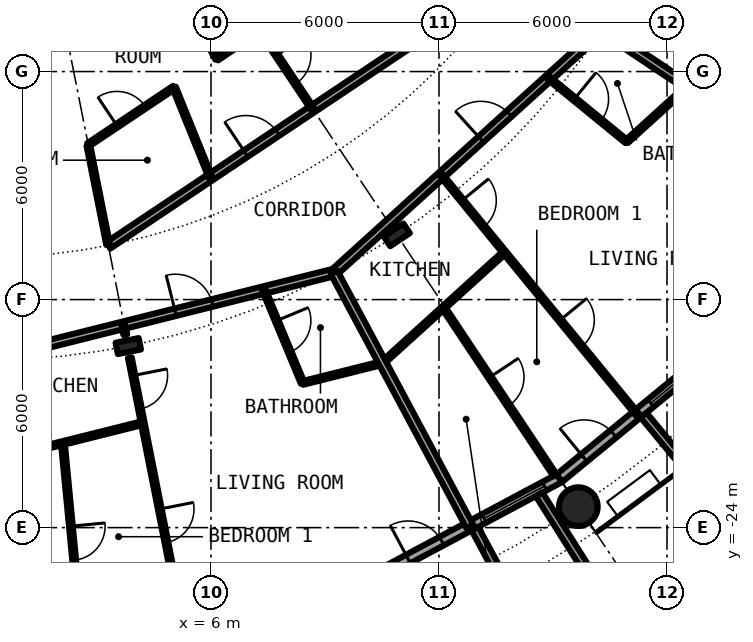
"""IFC4 building model, lengths in metres.
Left out: names, types, materials, properties, quantities, classifications, styles, units other than length and angle.
Written with IfcOpenShell. Run it as: python <this file> out.ifc"""

import sys

from ifc_helpers import new_model, si_unit, direction, frame, frame_2d, origin, origin_2d, place, context, subcontext, project, spatial, rectangle, hollow_circle, i_section, extrude, element, fill, save


model = new_model("IFC4")
c1 = context("Model", 3, precision=1e-05, world=origin(), true_north=direction((0.0, 1.0)))
c2 = subcontext(c1, "Body", "Model", "MODEL_VIEW")
j1 = project(units=[si_unit("LENGTHUNIT", "METRE"), si_unit("PLANEANGLEUNIT", "RADIAN")], contexts=[c1])
p1 = place(None, origin())
s1 = spatial("IfcSite", under=j1, at=p1, CompositionType="ELEMENT")
p2 = place(p1, origin())
s2 = spatial("IfcBuilding", under=s1, at=p2, CompositionType="ELEMENT")
p3 = place(p2, frame((0.0, 0.0, 31.95)))
s3 = spatial("IfcBuildingStorey", under=s2, at=p3, CompositionType="ELEMENT", Elevation=31.95)
p4 = place(p3, frame((15.667, -23.448, 0.0), z_axis=(0.0, 0.0, 1.0), x_axis=(1.0, 0.0, 0.0)))
e1 = element("IfcColumn", 1, at=p4, inside=s3, PredefinedType="COLUMN", context=c2, shape_type="SweptSolid", body=[
    extrude(hollow_circle(Radius=0.508, WallThickness=0.05, at=origin_2d()), origin(), (0.0, 0.0, 1.0), 3.05),
])
for number, where, z_axis, x_axis in (
    (2, (3.824, -19.223, 0.0), (0.0, 0.0, 1.0), (0.195, -0.981, 0.0)),
    (3, (10.889, -16.297, 0.0), (0.0, 0.0, 1.0), (0.556, -0.831, 0.0)),
):
    element("IfcColumn", number, at=place(p3, frame(where, z_axis=z_axis, x_axis=x_axis)), inside=s3, PredefinedType="COLUMN", context=c2, shape_type="SweptSolid", body=[
        extrude(i_section(OverallWidth=0.305, OverallDepth=0.62, WebThickness=0.021, FlangeThickness=0.04, FilletRadius=0.027, at=origin_2d()), origin(), (0.0, 0.0, 1.0), 3.05),
    ])
p5 = place(p3, frame((10.447, -25.222, 0.0), z_axis=(0.0, 0.0, 1.0), x_axis=(0.881915646801, 0.471407246368, 0.0)))
e4 = element("IfcWall", 4, at=p5, inside=s3, PredefinedType="SOLIDWALL", context=c2, shape_type="SweptSolid", body=[
    extrude(rectangle(XDim=5.352, YDim=0.25, at=frame_2d((2.676, 0.0))), origin(), (0.0, 0.0, 1.0), 2.7),
])
p6 = place(p5, frame((0.841, 0.0, 0.0)))
e5 = element("IfcOpeningElement", 5, at=p6, cuts=e4, PredefinedType="OPENING", context=c2, shape_type="SweptSolid", body=[
    extrude(rectangle(XDim=1.0, YDim=2.2, at=frame_2d((0.5, 1.1))), frame((0.0, 0.135, 0.0), z_axis=(0.0, -1.0, 0.0), x_axis=(1.0, 0.0, 0.0)), (0.0, 0.0, 1.0), 0.27),
])
p7 = place(p5, frame((3.111, 0.0, 0.3)))
e6 = element("IfcOpeningElement", 6, at=p7, cuts=e4, PredefinedType="OPENING", context=c2, shape_type="SweptSolid", body=[
    extrude(rectangle(XDim=1.8, YDim=2.1, at=frame_2d((0.9, 1.05))), frame((0.0, 0.135, 0.0), z_axis=(0.0, -1.0, 0.0), x_axis=(1.0, 0.0, 0.0)), (0.0, 0.0, 1.0), 0.27),
])
p8 = place(p3, frame((12.945, -24.029, -0.03), z_axis=(0.0, 0.0, 1.0), x_axis=(0.474424310775, -0.88029629861, 0.0)))
e7 = element("IfcWall", 7, at=p8, inside=s3, PredefinedType="SOLIDWALL", context=c2, shape_type="SweptSolid", body=[
    extrude(rectangle(XDim=3.006, YDim=0.2, at=frame_2d((1.503, 0.0))), origin(), (0.0, 0.0, 1.0), 2.73),
])
p9 = place(p3, frame((14.635, -23.126, -0.03), z_axis=(0.0, 0.0, 1.0), x_axis=(0.534437802731, -0.845207805816, 0.0)))
e8 = element("IfcWall", 8, at=p9, inside=s3, PredefinedType="SOLIDWALL", context=c2, shape_type="SweptSolid", body=[
    extrude(rectangle(XDim=2.932, YDim=0.2, at=frame_2d((1.466, 0.0))), origin(), (0.0, 0.0, 1.0), 2.73),
])
p10 = place(p3, frame((15.167, -22.699, 0.0), z_axis=(0.0, 0.0, 1.0), x_axis=(0.773019449054, 0.634382322723, 0.0)))
e9 = element("IfcWall", 9, at=p10, inside=s3, PredefinedType="SOLIDWALL", context=c2, shape_type="SweptSolid", body=[
    extrude(rectangle(XDim=5.352, YDim=0.25, at=frame_2d((2.676, 0.0))), origin(), (0.0, 0.0, 1.0), 2.7),
])
p11 = place(p10, frame((0.841, 0.0, 0.0)))
e10 = element("IfcOpeningElement", 10, at=p11, cuts=e9, PredefinedType="OPENING", context=c2, shape_type="SweptSolid", body=[
    extrude(rectangle(XDim=1.0, YDim=2.2, at=frame_2d((0.5, 1.1))), frame((0.0, 0.135, 0.0), z_axis=(0.0, -1.0, 0.0), x_axis=(1.0, 0.0, 0.0)), (0.0, 0.0, 1.0), 0.27),
])
p12 = place(p10, frame((3.111, 0.0, 0.3)))
e11 = element("IfcOpeningElement", 11, at=p12, cuts=e9, PredefinedType="OPENING", context=c2, shape_type="SweptSolid", body=[
    extrude(rectangle(XDim=1.8, YDim=2.1, at=frame_2d((0.9, 1.05))), frame((0.0, 0.135, 0.0), z_axis=(0.0, -1.0, 0.0), x_axis=(1.0, 0.0, 0.0)), (0.0, 0.0, 1.0), 0.27),
])
p13 = place(p3, frame((17.384, -21.041, -0.03), z_axis=(0.0, 0.0, 1.0), x_axis=(0.63709551667, -0.770784861449, 0.0)))
e12 = element("IfcWall", 12, at=p13, inside=s3, PredefinedType="SOLIDWALL", context=c2, shape_type="SweptSolid", body=[
    extrude(rectangle(XDim=3.006, YDim=0.2, at=frame_2d((1.503, 0.0))), origin(), (0.0, 0.0, 1.0), 2.73),
])
p14 = place(p3, frame((-0.006, -22.301, 0.0), z_axis=(0.0, 0.0, 1.0), x_axis=(0.970106148391, 0.24268098577, 0.0)))
e13 = element("IfcWall", 13, at=p14, inside=s3, PredefinedType="PARTITIONING", context=c2, shape_type="SweptSolid", body=[
    extrude(rectangle(XDim=4.347, YDim=0.1, at=frame_2d((2.173, 0.0))), origin(), (0.0, 0.0, 1.0), 2.7),
])
p15 = place(p3, frame((8.414, -20.193, 0.0), z_axis=(0.0, 0.0, 1.0), x_axis=(0.970076188308, 0.242800718444, 0.0)))
e14 = element("IfcWall", 14, at=p15, inside=s3, PredefinedType="PARTITIONING", context=c2, shape_type="SweptSolid", body=[
    extrude(rectangle(XDim=2.167, YDim=0.1, at=frame_2d((1.083, 0.0))), origin(), (0.0, 0.0, 1.0), 2.7),
])
p16 = place(p3, frame((10.513, -19.668, 0.0), z_axis=(0.0, 0.0, 1.0), x_axis=(0.74092137325, 0.671591779775, 0.0)))
e15 = element("IfcWall", 15, at=p16, inside=s3, PredefinedType="PARTITIONING", context=c2, shape_type="SweptSolid", body=[
    extrude(rectangle(XDim=4.342, YDim=0.1, at=frame_2d((2.171, 0.0))), origin(), (0.0, 0.0, 1.0), 2.7),
])
p17 = place(p3, frame((16.936, -13.845, 0.0), z_axis=(0.0, 0.0, 1.0), x_axis=(0.740836325503, 0.671685595212, 0.0)))
e16 = element("IfcWall", 16, at=p17, inside=s3, PredefinedType="PARTITIONING", context=c2, shape_type="SweptSolid", body=[
    extrude(rectangle(XDim=2.168, YDim=0.1, at=frame_2d((1.084, 0.0))), origin(), (0.0, 0.0, 1.0), 2.7),
])
p18 = place(p3, frame((-0.001, -19.601, 0.0), z_axis=(0.0, 0.0, 1.0), x_axis=(0.970014215304, 0.243048188859, 0.0)))
e17 = element("IfcWall", 17, at=p18, inside=s3, PredefinedType="PARTITIONING", context=c2, shape_type="SweptSolid", body=[
    extrude(rectangle(XDim=9.526, YDim=0.2, at=frame_2d((4.763, 0.0))), origin(), (0.0, 0.0, 1.0), 2.38),
])
p19 = place(p18, frame((5.221, 0.0, 0.0)))
e18 = element("IfcOpeningElement", 18, at=p19, cuts=e17, PredefinedType="OPENING", context=c2, shape_type="SweptSolid", body=[
    extrude(rectangle(XDim=1.0, YDim=2.3, at=frame_2d((0.5, 1.15))), frame((0.0, 0.11, 0.0), z_axis=(0.0, -1.0, 0.0), x_axis=(1.0, 0.0, 0.0)), (0.0, 0.0, 1.0), 0.22),
])
p20 = place(p3, frame((9.239, -17.286, 0.0), z_axis=(0.0, 0.0, 1.0), x_axis=(0.74089212117, 0.671624050186, 0.0)))
e19 = element("IfcWall", 19, at=p20, inside=s3, PredefinedType="PARTITIONING", context=c2, shape_type="SweptSolid", body=[
    extrude(rectangle(XDim=9.368, YDim=0.2, at=frame_2d((4.684, 0.0))), origin(), (0.0, 0.0, 1.0), 2.38),
])
p21 = place(p20, frame((5.215, 0.0, 0.0)))
e20 = element("IfcOpeningElement", 20, at=p21, cuts=e19, PredefinedType="OPENING", context=c2, shape_type="SweptSolid", body=[
    extrude(rectangle(XDim=1.0, YDim=2.3, at=frame_2d((0.5, 1.15))), frame((0.0, 0.11, 0.0), z_axis=(0.0, -1.0, 0.0), x_axis=(1.0, 0.0, 0.0)), (0.0, 0.0, 1.0), 0.22),
])
p22 = place(p3, frame((3.297, -16.575, 0.0), z_axis=(0.0, 0.0, 1.0), x_axis=(0.831561346449, 0.555432918625, 0.0)))
e21 = element("IfcWall", 21, at=p22, inside=s3, PredefinedType="PARTITIONING", context=c2, shape_type="SweptSolid", body=[
    extrude(rectangle(XDim=12.914, YDim=0.2, at=frame_2d((6.457, 0.0))), origin(), (0.0, 0.0, 1.0), 2.7),
])
p23 = place(p22, frame((4.352, 0.0, 0.0)))
e22 = element("IfcOpeningElement", 22, at=p23, cuts=e21, PredefinedType="OPENING", context=c2, shape_type="SweptSolid", body=[
    extrude(rectangle(XDim=1.0, YDim=2.3, at=frame_2d((0.5, 1.15))), frame((0.0, 0.11, 0.0), z_axis=(0.0, -1.0, 0.0), x_axis=(1.0, 0.0, 0.0)), (0.0, 0.0, 1.0), 0.22),
])
p24 = place(p3, frame((2.77, -13.927, 0.0), z_axis=(0.0, 0.0, 1.0), x_axis=(0.831538390496, 0.555467285384, 0.0)))
e23 = element("IfcWall", 23, at=p24, inside=s3, PredefinedType="PARTITIONING", context=c2, shape_type="SweptSolid", body=[
    extrude(rectangle(XDim=2.717, YDim=0.1, at=frame_2d((1.358, 0.0))), origin(), (0.0, 0.0, 1.0), 2.7),
])
p25 = place(p24, frame((0.908, 0.0, 0.0)))
e24 = element("IfcOpeningElement", 24, at=p25, cuts=e23, PredefinedType="OPENING", context=c2, shape_type="SweptSolid", body=[
    extrude(rectangle(XDim=0.9, YDim=2.3, at=frame_2d((0.45, 1.15))), frame((0.0, 0.06, 0.0), z_axis=(0.0, -1.0, 0.0), x_axis=(1.0, 0.0, 0.0)), (0.0, 0.0, 1.0), 0.12),
])
p26 = place(p3, frame((6.158, -11.664, 0.0), z_axis=(0.0, 0.0, 1.0), x_axis=(0.831459707426, 0.555585056429, 0.0)))
e25 = element("IfcWall", 25, at=p26, inside=s3, PredefinedType="PARTITIONING", context=c2, shape_type="SweptSolid", body=[
    extrude(rectangle(XDim=4.073, YDim=0.1, at=frame_2d((2.037, 0.0))), origin(), (0.0, 0.0, 1.0), 2.7),
])
p27 = place(p3, frame((2.102, -21.773, 0.0), z_axis=(0.0, 0.0, 1.0), x_axis=(0.096215269366, -0.995360548716, 0.0)))
e26 = element("IfcWall", 26, at=p27, inside=s3, PredefinedType="PARTITIONING", context=c2, shape_type="SweptSolid", body=[
    extrude(rectangle(XDim=5.301, YDim=0.1, at=frame_2d((2.65, 0.0))), origin(), (0.0, 0.0, 1.0), 2.7),
])
p28 = place(p27, frame((2.2, 0.0, 0.0)))
e27 = element("IfcOpeningElement", 27, at=p28, cuts=e26, PredefinedType="OPENING", context=c2, shape_type="SweptSolid", body=[
    extrude(rectangle(XDim=0.9, YDim=2.3, at=frame_2d((0.45, 1.15))), frame((0.0, 0.06, 0.0), z_axis=(0.0, -1.0, 0.0), x_axis=(1.0, 0.0, 0.0)), (0.0, 0.0, 1.0), 0.12),
])
p29 = place(p3, frame((3.605, -6.827, 0.0), z_axis=(0.0, 0.0, 1.0), x_axis=(0.466976820365, -0.884269556889, 0.0)))
e28 = element("IfcWall", 28, at=p29, inside=s3, PredefinedType="PARTITIONING", context=c2, shape_type="SweptSolid", body=[
    extrude(rectangle(XDim=5.469, YDim=0.1, at=frame_2d((2.735, 0.0))), origin(), (0.0, 0.0, 1.0), 2.7),
])
p30 = place(p29, frame((2.284, 0.0, 0.0)))
e29 = element("IfcOpeningElement", 29, at=p30, cuts=e28, PredefinedType="OPENING", context=c2, shape_type="SweptSolid", body=[
    extrude(rectangle(XDim=0.9, YDim=2.3, at=frame_2d((0.45, 1.15))), frame((0.0, 0.06, 0.0), z_axis=(0.0, -1.0, 0.0), x_axis=(1.0, 0.0, 0.0)), (0.0, 0.0, 1.0), 0.12),
])
p31 = place(p3, frame((3.695, -18.674, 0.0), z_axis=(0.0, 0.0, 1.0), x_axis=(0.197040251839, -0.980395399395, 0.0)))
e30 = element("IfcWall", 30, at=p31, inside=s3, PredefinedType="PARTITIONING", context=c2, shape_type="SweptSolid", body=[
    extrude(rectangle(XDim=0.254, YDim=0.1, at=frame_2d((0.127, 0.0))), origin(), (0.0, 0.0, 1.0), 2.7),
])
p32 = place(p3, frame((3.865, -19.531, 0.0), z_axis=(0.0, 0.0, 1.0), x_axis=(0.194196464481, -0.980962656365, 0.0)))
e31 = element("IfcWall", 31, at=p32, inside=s3, PredefinedType="PARTITIONING", context=c2, shape_type="SweptSolid", body=[
    extrude(rectangle(XDim=7.265, YDim=0.1, at=frame_2d((3.633, 0.0))), origin(), (0.0, 0.0, 1.0), 2.7),
])
p33 = place(p32, frame((0.476, 0.0, 0.0)))
e32 = element("IfcOpeningElement", 32, at=p33, cuts=e31, PredefinedType="OPENING", context=c2, shape_type="SweptSolid", body=[
    extrude(rectangle(XDim=0.9, YDim=2.3, at=frame_2d((0.45, 1.15))), frame((0.0, 0.06, 0.0), z_axis=(0.0, -1.0, 0.0), x_axis=(1.0, 0.0, 0.0)), (0.0, 0.0, 1.0), 0.12),
])
p34 = place(p32, frame((4.058, 0.0, 0.0)))
e33 = element("IfcOpeningElement", 33, at=p34, cuts=e31, PredefinedType="OPENING", context=c2, shape_type="SweptSolid", body=[
    extrude(rectangle(XDim=0.9, YDim=2.3, at=frame_2d((0.45, 1.15))), frame((0.0, 0.06, 0.0), z_axis=(0.0, -1.0, 0.0), x_axis=(1.0, 0.0, 0.0)), (0.0, 0.0, 1.0), 0.12),
])
p35 = place(p3, frame((5.029, -12.418, 0.0), z_axis=(0.0, 0.0, 1.0), x_axis=(0.375649498413, -0.926761811008, 0.0)))
e34 = element("IfcWall", 34, at=p35, inside=s3, PredefinedType="PARTITIONING", context=c2, shape_type="SweptSolid", body=[
    extrude(rectangle(XDim=2.548, YDim=0.1, at=frame_2d((1.274, 0.0))), origin(), (0.0, 0.0, 1.0), 2.7),
])
p36 = place(p3, frame((7.289, -10.908, 0.0), z_axis=(0.0, 0.0, 1.0), x_axis=(0.555355163998, -0.831613276602, 0.0)))
e35 = element("IfcWall", 35, at=p36, inside=s3, PredefinedType="PARTITIONING", context=c2, shape_type="SweptSolid", body=[
    extrude(rectangle(XDim=2.494, YDim=0.1, at=frame_2d((1.247, 0.0))), origin(), (0.0, 0.0, 1.0), 2.7),
])
p37 = place(p36, frame((0.797, 0.0, 0.0)))
e36 = element("IfcOpeningElement", 36, at=p37, cuts=e35, PredefinedType="OPENING", context=c2, shape_type="SweptSolid", body=[
    extrude(rectangle(XDim=0.9, YDim=2.3, at=frame_2d((0.45, 1.15))), frame((0.0, 0.06, 0.0), z_axis=(0.0, -1.0, 0.0), x_axis=(1.0, 0.0, 0.0)), (0.0, 0.0, 1.0), 0.12),
])
p38 = place(p3, frame((7.392, -17.749, 0.0), z_axis=(0.0, 0.0, 1.0), x_axis=(0.384438589316, -0.923150567917, 0.0)))
e37 = element("IfcWall", 37, at=p38, inside=s3, PredefinedType="PARTITIONING", context=c2, shape_type="SweptSolid", body=[
    extrude(rectangle(XDim=2.647, YDim=0.1, at=frame_2d((1.324, 0.0))), origin(), (0.0, 0.0, 1.0), 2.7),
])
p39 = place(p38, frame((0.874, 0.0, 0.0)))
e38 = element("IfcOpeningElement", 38, at=p39, cuts=e37, PredefinedType="OPENING", context=c2, shape_type="SweptSolid", body=[
    extrude(rectangle(XDim=0.9, YDim=2.3, at=frame_2d((0.45, 1.15))), frame((0.0, 0.06, 0.0), z_axis=(0.0, -1.0, 0.0), x_axis=(1.0, 0.0, 0.0)), (0.0, 0.0, 1.0), 0.12),
])
p40 = place(p3, frame((9.239, -17.286, 0.0), z_axis=(0.0, 0.0, 1.0), x_axis=(0.471439510802, -0.881898399848, 0.0)))
e39 = element("IfcWall", 39, at=p40, inside=s3, PredefinedType="PARTITIONING", context=c2, shape_type="SweptSolid", body=[
    extrude(rectangle(XDim=7.575, YDim=0.2, at=frame_2d((3.787, 0.0))), origin(), (0.0, 0.0, 1.0), 2.7),
])
p41 = place(p3, frame((12.062, -14.727, 0.0), z_axis=(0.0, 0.0, 1.0), x_axis=(0.633664062855, -0.773608334654, 0.0)))
e40 = element("IfcWall", 40, at=p41, inside=s3, PredefinedType="PARTITIONING", context=c2, shape_type="SweptSolid", body=[
    extrude(rectangle(XDim=8.138, YDim=0.1, at=frame_2d((4.069, 0.0))), origin(), (0.0, 0.0, 1.0), 2.7),
])
p42 = place(p41, frame((0.861, 0.0, 0.0)))
e41 = element("IfcOpeningElement", 41, at=p42, cuts=e40, PredefinedType="OPENING", context=c2, shape_type="SweptSolid", body=[
    extrude(rectangle(XDim=0.9, YDim=2.3, at=frame_2d((0.45, 1.15))), frame((0.0, 0.06, 0.0), z_axis=(0.0, -1.0, 0.0), x_axis=(1.0, 0.0, 0.0)), (0.0, 0.0, 1.0), 0.12),
])
p43 = place(p41, frame((4.931, 0.0, 0.0)))
e42 = element("IfcOpeningElement", 42, at=p43, cuts=e40, PredefinedType="OPENING", context=c2, shape_type="SweptSolid", body=[
    extrude(rectangle(XDim=0.9, YDim=2.3, at=frame_2d((0.45, 1.15))), frame((0.0, 0.06, 0.0), z_axis=(0.0, -1.0, 0.0), x_axis=(1.0, 0.0, 0.0)), (0.0, 0.0, 1.0), 0.12),
])
p44 = place(p3, frame((12.118, -18.211, 0.0), z_axis=(0.0, 0.0, 1.0), x_axis=(0.553913391217, -0.832574294, 0.0)))
e43 = element("IfcWall", 43, at=p44, inside=s3, PredefinedType="PARTITIONING", context=c2, shape_type="SweptSolid", body=[
    extrude(rectangle(XDim=5.301, YDim=0.1, at=frame_2d((2.65, 0.0))), origin(), (0.0, 0.0, 1.0), 2.7),
])
p45 = place(p44, frame((2.2, 0.0, 0.0)))
e44 = element("IfcOpeningElement", 44, at=p45, cuts=e43, PredefinedType="OPENING", context=c2, shape_type="SweptSolid", body=[
    extrude(rectangle(XDim=0.9, YDim=2.3, at=frame_2d((0.45, 1.15))), frame((0.0, 0.06, 0.0), z_axis=(0.0, -1.0, 0.0), x_axis=(1.0, 0.0, 0.0)), (0.0, 0.0, 1.0), 0.12),
])
p46 = place(p3, frame((14.885, -12.168, 0.0), z_axis=(0.0, 0.0, 1.0), x_axis=(0.774162545943, -0.632986850147, 0.0)))
e45 = element("IfcWall", 45, at=p46, inside=s3, PredefinedType="PARTITIONING", context=c2, shape_type="SweptSolid", body=[
    extrude(rectangle(XDim=2.649, YDim=0.1, at=frame_2d((1.325, 0.0))), origin(), (0.0, 0.0, 1.0), 2.7),
])
p47 = place(p46, frame((0.875, 0.0, 0.0)))
e46 = element("IfcOpeningElement", 46, at=p47, cuts=e45, PredefinedType="OPENING", context=c2, shape_type="SweptSolid", body=[
    extrude(rectangle(XDim=0.9, YDim=2.3, at=frame_2d((0.45, 1.15))), frame((0.0, 0.06, 0.0), z_axis=(0.0, -1.0, 0.0), x_axis=(1.0, 0.0, 0.0)), (0.0, 0.0, 1.0), 0.12),
])
p48 = place(p3, frame((16.555, -11.061, 0.0), z_axis=(0.0, 0.0, 1.0), x_axis=(0.831507055747, -0.555514190857, 0.0)))
e47 = element("IfcWall", 47, at=p48, inside=s3, PredefinedType="PARTITIONING", context=c2, shape_type="SweptSolid", body=[
    extrude(rectangle(XDim=7.265, YDim=0.2, at=frame_2d((3.633, 0.0))), origin(), (0.0, 0.0, 1.0), 2.7),
])
p49 = place(p3, frame((3.293, -16.554, 0.0), z_axis=(0.0, 0.0, 1.0), x_axis=(-0.195338620417, 0.980735858105, 0.0)))
e48 = element("IfcWall", 48, at=p49, inside=s3, PredefinedType="PARTITIONING", context=c2, shape_type="SweptSolid", body=[
    extrude(rectangle(XDim=2.657, YDim=0.1, at=frame_2d((1.329, 0.0))), origin(), (0.0, 0.0, 1.0), 2.7),
])
p50 = place(p6, origin())
e49 = element("IfcDoor", 49, at=p50, inside=s3, OperationType="SINGLE_SWING_LEFT", PredefinedType="DOOR", context=c2, shape_type="SweptSolid", body=[
    extrude(rectangle(XDim=1.0, YDim=2.2, at=frame_2d((0.5, 1.1))), frame((0.0, 0.025, 0.0), z_axis=(0.0, -1.0, 0.0), x_axis=(1.0, 0.0, 0.0)), (0.0, 0.0, 1.0), 0.05),
])
fill(e5, e49)
p51 = place(p7, origin())
e50 = element("IfcWindow", 50, at=p51, inside=s3, PartitioningType="SINGLE_PANEL", PredefinedType="WINDOW", context=c2, shape_type="SweptSolid", body=[
    extrude(rectangle(XDim=1.8, YDim=2.1, at=frame_2d((0.9, 1.05))), frame((0.0, 0.03, 0.0), z_axis=(0.0, -1.0, 0.0), x_axis=(1.0, 0.0, 0.0)), (0.0, 0.0, 1.0), 0.06),
])
fill(e6, e50)
p52 = place(p11, origin())
e51 = element("IfcDoor", 51, at=p52, inside=s3, OperationType="SINGLE_SWING_LEFT", PredefinedType="DOOR", context=c2, shape_type="SweptSolid", body=[
    extrude(rectangle(XDim=1.0, YDim=2.2, at=frame_2d((0.5, 1.1))), frame((0.0, 0.025, 0.0), z_axis=(0.0, -1.0, 0.0), x_axis=(1.0, 0.0, 0.0)), (0.0, 0.0, 1.0), 0.05),
])
fill(e10, e51)
p53 = place(p12, origin())
e52 = element("IfcWindow", 52, at=p53, inside=s3, PartitioningType="SINGLE_PANEL", PredefinedType="WINDOW", context=c2, shape_type="SweptSolid", body=[
    extrude(rectangle(XDim=1.8, YDim=2.1, at=frame_2d((0.9, 1.05))), frame((0.0, 0.03, 0.0), z_axis=(0.0, -1.0, 0.0), x_axis=(1.0, 0.0, 0.0)), (0.0, 0.0, 1.0), 0.06),
])
fill(e11, e52)
p54 = place(p19, origin())
e53 = element("IfcDoor", 53, at=p54, inside=s3, OperationType="SINGLE_SWING_RIGHT", PredefinedType="DOOR", context=c2, shape_type="SweptSolid", body=[
    extrude(rectangle(XDim=1.0, YDim=2.3, at=frame_2d((0.5, 1.15))), frame((0.0, 0.025, 0.0), z_axis=(0.0, -1.0, 0.0), x_axis=(1.0, 0.0, 0.0)), (0.0, 0.0, 1.0), 0.05),
])
fill(e18, e53)
p55 = place(p39, origin())
e54 = element("IfcDoor", 54, at=p55, inside=s3, OperationType="SINGLE_SWING_RIGHT", PredefinedType="DOOR", context=c2, shape_type="SweptSolid", body=[
    extrude(rectangle(XDim=0.9, YDim=2.3, at=frame_2d((0.45, 1.15))), frame((0.0, 0.025, 0.0), z_axis=(0.0, -1.0, 0.0), x_axis=(1.0, 0.0, 0.0)), (0.0, 0.0, 1.0), 0.05),
])
fill(e38, e54)
p56 = place(p33, origin())
e55 = element("IfcDoor", 55, at=p56, inside=s3, OperationType="SINGLE_SWING_LEFT", PredefinedType="DOOR", context=c2, shape_type="SweptSolid", body=[
    extrude(rectangle(XDim=0.9, YDim=2.3, at=frame_2d((0.45, 1.15))), frame((0.0, 0.025, 0.0), z_axis=(0.0, -1.0, 0.0), x_axis=(1.0, 0.0, 0.0)), (0.0, 0.0, 1.0), 0.05),
])
fill(e32, e55)
p57 = place(p34, origin())
e56 = element("IfcDoor", 56, at=p57, inside=s3, OperationType="SINGLE_SWING_RIGHT", PredefinedType="DOOR", context=c2, shape_type="SweptSolid", body=[
    extrude(rectangle(XDim=0.9, YDim=2.3, at=frame_2d((0.45, 1.15))), frame((0.0, 0.025, 0.0), z_axis=(0.0, -1.0, 0.0), x_axis=(1.0, 0.0, 0.0)), (0.0, 0.0, 1.0), 0.05),
])
fill(e33, e56)
p58 = place(p28, origin())
e57 = element("IfcDoor", 57, at=p58, inside=s3, OperationType="SINGLE_SWING_RIGHT", PredefinedType="DOOR", context=c2, shape_type="SweptSolid", body=[
    extrude(rectangle(XDim=0.9, YDim=2.3, at=frame_2d((0.45, 1.15))), frame((0.0, 0.025, 0.0), z_axis=(0.0, -1.0, 0.0), x_axis=(1.0, 0.0, 0.0)), (0.0, 0.0, 1.0), 0.05),
])
fill(e27, e57)
p59 = place(p21, origin())
e58 = element("IfcDoor", 58, at=p59, inside=s3, OperationType="SINGLE_SWING_RIGHT", PredefinedType="DOOR", context=c2, shape_type="SweptSolid", body=[
    extrude(rectangle(XDim=1.0, YDim=2.3, at=frame_2d((0.5, 1.15))), frame((0.0, 0.025, 0.0), z_axis=(0.0, -1.0, 0.0), x_axis=(1.0, 0.0, 0.0)), (0.0, 0.0, 1.0), 0.05),
])
fill(e20, e58)
p60 = place(p47, origin())
e59 = element("IfcDoor", 59, at=p60, inside=s3, OperationType="SINGLE_SWING_RIGHT", PredefinedType="DOOR", context=c2, shape_type="SweptSolid", body=[
    extrude(rectangle(XDim=0.9, YDim=2.3, at=frame_2d((0.45, 1.15))), frame((0.0, 0.025, 0.0), z_axis=(0.0, -1.0, 0.0), x_axis=(1.0, 0.0, 0.0)), (0.0, 0.0, 1.0), 0.05),
])
fill(e46, e59)
p61 = place(p42, origin())
e60 = element("IfcDoor", 60, at=p61, inside=s3, OperationType="SINGLE_SWING_LEFT", PredefinedType="DOOR", context=c2, shape_type="SweptSolid", body=[
    extrude(rectangle(XDim=0.9, YDim=2.3, at=frame_2d((0.45, 1.15))), frame((0.0, 0.025, 0.0), z_axis=(0.0, -1.0, 0.0), x_axis=(1.0, 0.0, 0.0)), (0.0, 0.0, 1.0), 0.05),
])
fill(e41, e60)
p62 = place(p43, origin())
e61 = element("IfcDoor", 61, at=p62, inside=s3, OperationType="SINGLE_SWING_RIGHT", PredefinedType="DOOR", context=c2, shape_type="SweptSolid", body=[
    extrude(rectangle(XDim=0.9, YDim=2.3, at=frame_2d((0.45, 1.15))), frame((0.0, 0.025, 0.0), z_axis=(0.0, -1.0, 0.0), x_axis=(1.0, 0.0, 0.0)), (0.0, 0.0, 1.0), 0.05),
])
fill(e42, e61)
p63 = place(p45, origin())
e62 = element("IfcDoor", 62, at=p63, inside=s3, OperationType="SINGLE_SWING_RIGHT", PredefinedType="DOOR", context=c2, shape_type="SweptSolid", body=[
    extrude(rectangle(XDim=0.9, YDim=2.3, at=frame_2d((0.45, 1.15))), frame((0.0, 0.025, 0.0), z_axis=(0.0, -1.0, 0.0), x_axis=(1.0, 0.0, 0.0)), (0.0, 0.0, 1.0), 0.05),
])
fill(e44, e62)
p64 = place(p23, origin())
e63 = element("IfcDoor", 63, at=p64, inside=s3, OperationType="SINGLE_SWING_LEFT", PredefinedType="DOOR", context=c2, shape_type="SweptSolid", body=[
    extrude(rectangle(XDim=1.0, YDim=2.3, at=frame_2d((0.5, 1.15))), frame((0.0, 0.025, 0.0), z_axis=(0.0, -1.0, 0.0), x_axis=(1.0, 0.0, 0.0)), (0.0, 0.0, 1.0), 0.05),
])
fill(e22, e63)
p65 = place(p25, origin())
e64 = element("IfcDoor", 64, at=p65, inside=s3, OperationType="SINGLE_SWING_RIGHT", PredefinedType="DOOR", context=c2, shape_type="SweptSolid", body=[
    extrude(rectangle(XDim=0.9, YDim=2.3, at=frame_2d((0.45, 1.15))), frame((0.0, 0.025, 0.0), z_axis=(0.0, -1.0, 0.0), x_axis=(1.0, 0.0, 0.0)), (0.0, 0.0, 1.0), 0.05),
])
fill(e24, e64)
p66 = place(p37, origin())
e65 = element("IfcDoor", 65, at=p66, inside=s3, OperationType="SINGLE_SWING_RIGHT", PredefinedType="DOOR", context=c2, shape_type="SweptSolid", body=[
    extrude(rectangle(XDim=0.9, YDim=2.3, at=frame_2d((0.45, 1.15))), frame((0.0, 0.025, 0.0), z_axis=(0.0, -1.0, 0.0), x_axis=(1.0, 0.0, 0.0)), (0.0, 0.0, 1.0), 0.05),
])
fill(e36, e65)
save(model, sys.argv[1])
